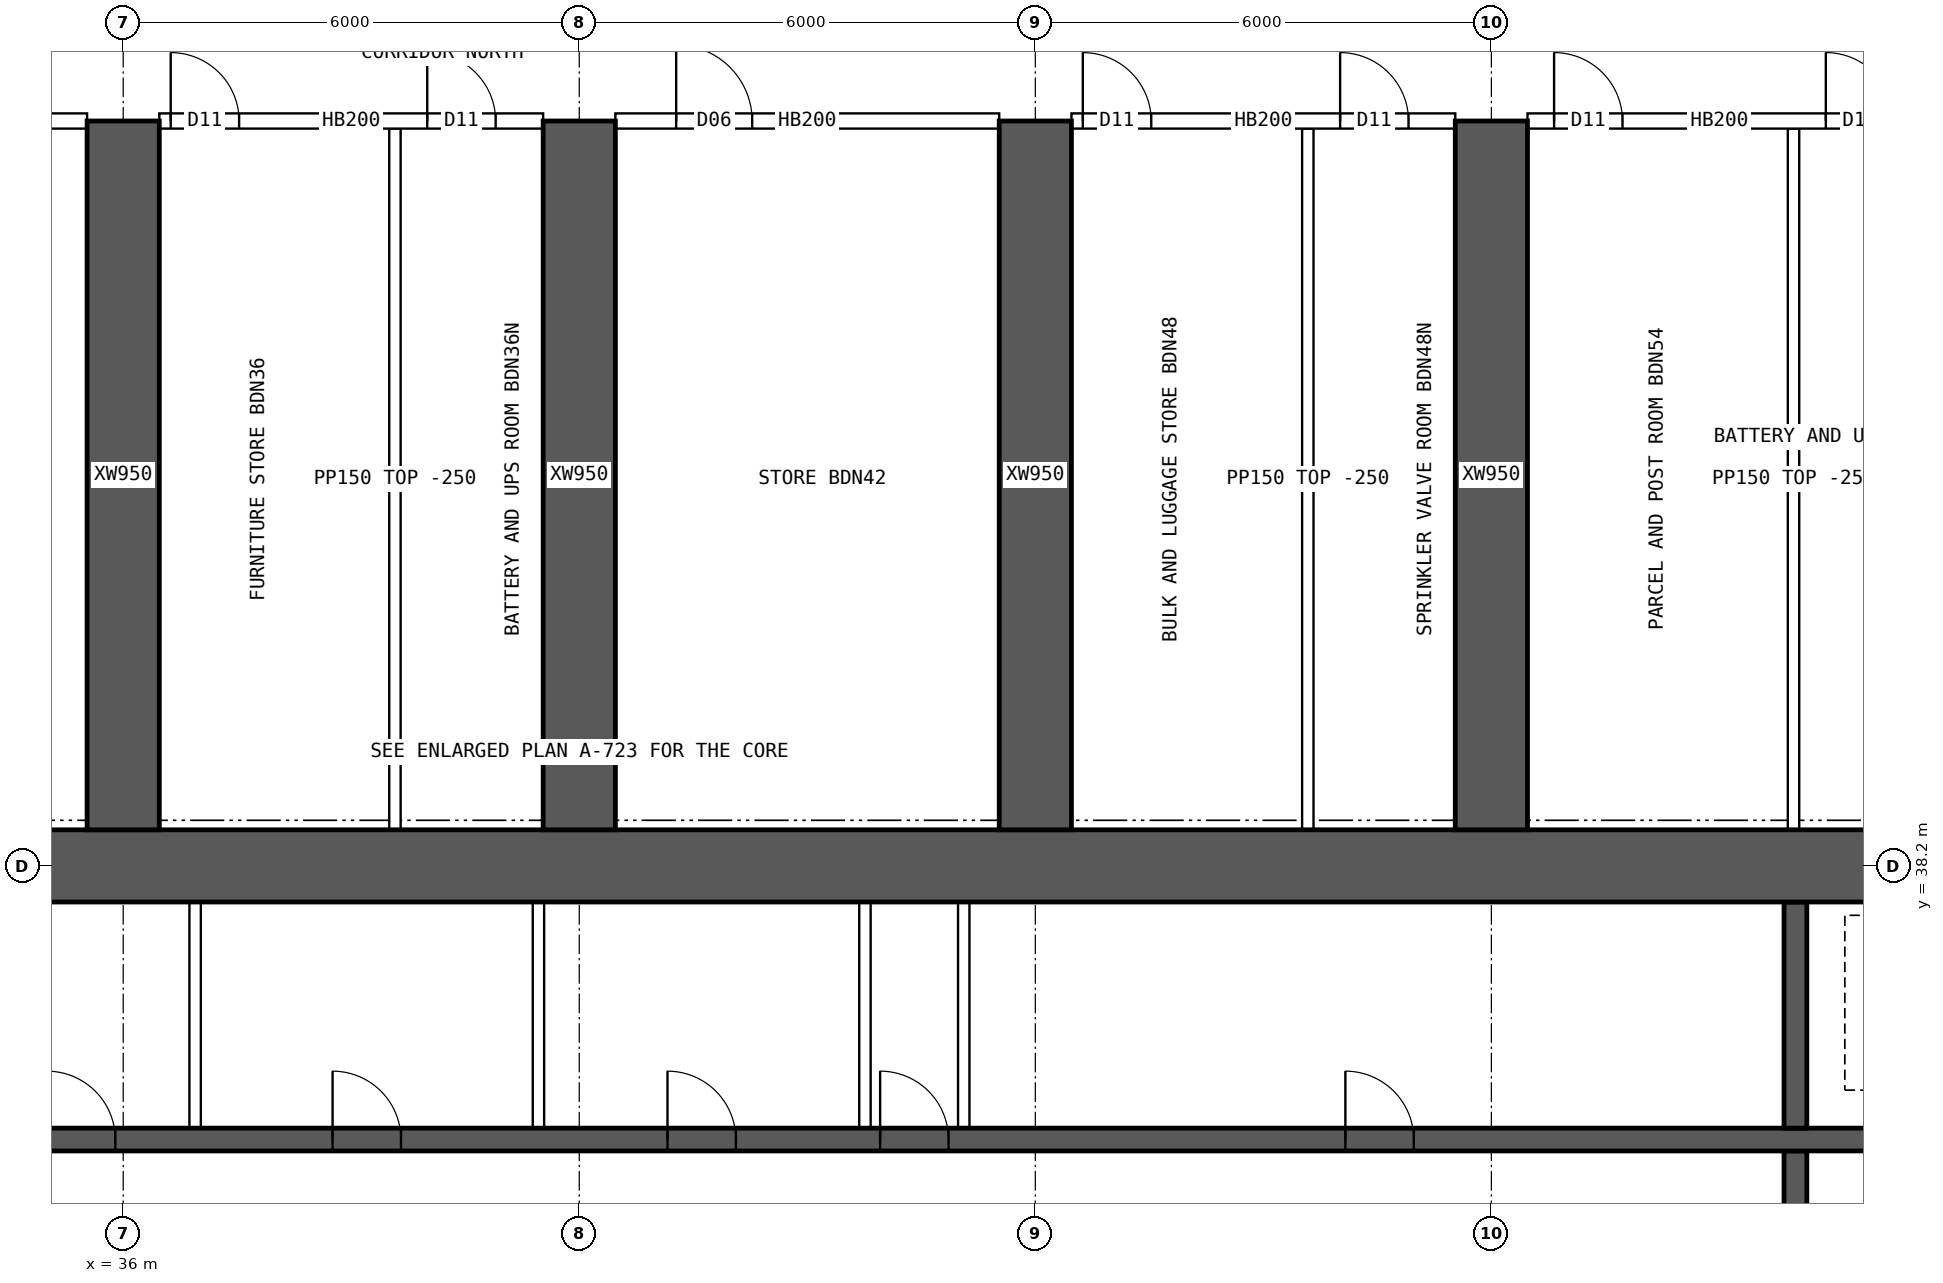
"""IFC4 building model, lengths in metres.
Left out: names, types, materials, properties, quantities, classifications, styles, units other than length and angle.
Written with IfcOpenShell. Run it as: python <this file> out.ifc"""

import sys

from ifc_helpers import new_model, si_unit, direction, frame, frame_2d, origin, place, context, subcontext, project, spatial, rectangle, extrude, element, fill, save


model = new_model("IFC4")
c1 = context("Model", 3, precision=1e-05, world=origin(), true_north=direction((0.0, 1.0)))
c2 = subcontext(c1, "Body", "Model", "MODEL_VIEW")
j1 = project(units=[si_unit("LENGTHUNIT", "METRE"), si_unit("PLANEANGLEUNIT", "RADIAN")], contexts=[c1])
p1 = place(None, origin())
s1 = spatial("IfcSite", under=j1, at=p1, CompositionType="ELEMENT")
p2 = place(p1, origin())
s2 = spatial("IfcBuilding", under=s1, at=p2, CompositionType="ELEMENT")
p3 = place(p2, frame((0.0, 0.0, 84.4)))
s3 = spatial("IfcBuildingStorey", under=s2, at=p3, CompositionType="ELEMENT", Elevation=84.4)
p4 = place(p3, frame((18.0, 38.2, 0.0), z_axis=(0.0, 0.0, 1.0), x_axis=(1.0, 0.0, 0.0)))
e1 = element("IfcWall", 1, at=p4, inside=s3, PredefinedType="SHEAR", context=c2, shape_type="SweptSolid", body=[
    extrude(rectangle(XDim=48.0, YDim=0.95, at=frame_2d((24.0, 0.0))), origin(), (0.0, 0.0, 1.0), 3.75),
])
p5 = place(p3, frame((18.475, 34.6, 0.0), z_axis=(0.0, 0.0, 1.0), x_axis=(1.0, 0.0, 0.0)))
e2 = element("IfcWall", 2, at=p5, inside=s3, PredefinedType="SHEAR", context=c2, shape_type="SweptSolid", body=[
    extrude(rectangle(XDim=47.05, YDim=0.3, at=frame_2d((23.525, 0.0))), origin(), (0.0, 0.0, 1.0), 3.75),
])
p6 = place(p5, frame((0.9, 0.0, 0.0)))
e3 = element("IfcOpeningElement", 3, at=p6, cuts=e2, PredefinedType="OPENING", context=c2, shape_type="SweptSolid", body=[
    extrude(rectangle(XDim=1.1, YDim=2.1, at=frame_2d((0.55, 1.05))), frame((0.0, 0.16, 0.0), z_axis=(0.0, -1.0, 0.0), x_axis=(1.0, 0.0, 0.0)), (0.0, 0.0, 1.0), 0.32),
])
p7 = place(p5, frame((45.05, 0.0, 0.0)))
e4 = element("IfcOpeningElement", 4, at=p7, cuts=e2, PredefinedType="OPENING", context=c2, shape_type="SweptSolid", body=[
    extrude(rectangle(XDim=1.1, YDim=2.1, at=frame_2d((0.55, 1.05))), frame((0.0, 0.16, 0.0), z_axis=(0.0, -1.0, 0.0), x_axis=(1.0, 0.0, 0.0)), (0.0, 0.0, 1.0), 0.32),
])
p8 = place(p5, frame((4.125, 0.0, 0.0)))
e5 = element("IfcOpeningElement", 5, at=p8, cuts=e2, PredefinedType="OPENING", context=c2, shape_type="SweptSolid", body=[
    extrude(rectangle(XDim=0.9, YDim=2.1, at=frame_2d((0.45, 1.05))), frame((0.0, 0.16, 0.0), z_axis=(0.0, -1.0, 0.0), x_axis=(1.0, 0.0, 0.0)), (0.0, 0.0, 1.0), 0.32),
])
p9 = place(p5, frame((42.025, 0.0, 0.0)))
e6 = element("IfcOpeningElement", 6, at=p9, cuts=e2, PredefinedType="OPENING", context=c2, shape_type="SweptSolid", body=[
    extrude(rectangle(XDim=0.9, YDim=2.1, at=frame_2d((0.45, 1.05))), frame((0.0, 0.16, 0.0), z_axis=(0.0, -1.0, 0.0), x_axis=(1.0, 0.0, 0.0)), (0.0, 0.0, 1.0), 0.32),
])
p10 = place(p5, frame((8.9, 0.0, 0.0)))
e7 = element("IfcOpeningElement", 7, at=p10, cuts=e2, PredefinedType="OPENING", context=c2, shape_type="SweptSolid", body=[
    extrude(rectangle(XDim=0.9, YDim=2.1, at=frame_2d((0.45, 1.05))), frame((0.0, 0.16, 0.0), z_axis=(0.0, -1.0, 0.0), x_axis=(1.0, 0.0, 0.0)), (0.0, 0.0, 1.0), 0.32),
])
p11 = place(p5, frame((12.874, 0.0, 0.0)))
e8 = element("IfcOpeningElement", 8, at=p11, cuts=e2, PredefinedType="OPENING", context=c2, shape_type="SweptSolid", body=[
    extrude(rectangle(XDim=0.9, YDim=2.1, at=frame_2d((0.45, 1.05))), frame((0.0, 0.16, 0.0), z_axis=(0.0, -1.0, 0.0), x_axis=(1.0, 0.0, 0.0)), (0.0, 0.0, 1.0), 0.32),
])
p12 = place(p5, frame((16.521, 0.0, 0.0)))
e9 = element("IfcOpeningElement", 9, at=p12, cuts=e2, PredefinedType="OPENING", context=c2, shape_type="SweptSolid", body=[
    extrude(rectangle(XDim=0.9, YDim=2.1, at=frame_2d((0.45, 1.05))), frame((0.0, 0.16, 0.0), z_axis=(0.0, -1.0, 0.0), x_axis=(1.0, 0.0, 0.0)), (0.0, 0.0, 1.0), 0.32),
])
p13 = place(p5, frame((20.28, 0.0, 0.0)))
e10 = element("IfcOpeningElement", 10, at=p13, cuts=e2, PredefinedType="OPENING", context=c2, shape_type="SweptSolid", body=[
    extrude(rectangle(XDim=0.9, YDim=2.1, at=frame_2d((0.45, 1.05))), frame((0.0, 0.16, 0.0), z_axis=(0.0, -1.0, 0.0), x_axis=(1.0, 0.0, 0.0)), (0.0, 0.0, 1.0), 0.32),
])
p14 = place(p5, frame((24.686, 0.0, 0.0)))
e11 = element("IfcOpeningElement", 11, at=p14, cuts=e2, PredefinedType="OPENING", context=c2, shape_type="SweptSolid", body=[
    extrude(rectangle(XDim=0.9, YDim=2.1, at=frame_2d((0.45, 1.05))), frame((0.0, 0.16, 0.0), z_axis=(0.0, -1.0, 0.0), x_axis=(1.0, 0.0, 0.0)), (0.0, 0.0, 1.0), 0.32),
])
p15 = place(p5, frame((27.483, 0.0, 0.0)))
e12 = element("IfcOpeningElement", 12, at=p15, cuts=e2, PredefinedType="OPENING", context=c2, shape_type="SweptSolid", body=[
    extrude(rectangle(XDim=0.9, YDim=2.1, at=frame_2d((0.45, 1.05))), frame((0.0, 0.16, 0.0), z_axis=(0.0, -1.0, 0.0), x_axis=(1.0, 0.0, 0.0)), (0.0, 0.0, 1.0), 0.32),
])
p16 = place(p5, frame((33.604, 0.0, 0.0)))
e13 = element("IfcOpeningElement", 13, at=p16, cuts=e2, PredefinedType="OPENING", context=c2, shape_type="SweptSolid", body=[
    extrude(rectangle(XDim=0.9, YDim=2.1, at=frame_2d((0.45, 1.05))), frame((0.0, 0.16, 0.0), z_axis=(0.0, -1.0, 0.0), x_axis=(1.0, 0.0, 0.0)), (0.0, 0.0, 1.0), 0.32),
])
p17 = place(p3, frame((58.0, 30.55, 0.0), z_axis=(0.0, 0.0, 1.0), x_axis=(0.0, 1.0, 0.0)))
e14 = element("IfcWall", 14, at=p17, inside=s3, PredefinedType="SHEAR", context=c2, shape_type="SweptSolid", body=[
    extrude(rectangle(XDim=3.9, YDim=0.3, at=frame_2d((1.95, 0.0))), origin(), (0.0, 0.0, 1.0), 3.75),
])
p18 = place(p17, frame((1.4, 0.0, 0.0)))
e15 = element("IfcOpeningElement", 15, at=p18, cuts=e14, PredefinedType="OPENING", context=c2, shape_type="SweptSolid", body=[
    extrude(rectangle(XDim=1.2, YDim=2.1, at=frame_2d((0.6, 1.05))), frame((0.0, 0.16, 0.0), z_axis=(0.0, -1.0, 0.0), x_axis=(1.0, 0.0, 0.0)), (0.0, 0.0, 1.0), 0.32),
])
p19 = place(p3, frame((58.0, 34.75, 0.0), z_axis=(0.0, 0.0, 1.0), x_axis=(0.0, 1.0, 0.0)))
e16 = element("IfcWall", 16, at=p19, inside=s3, PredefinedType="SHEAR", context=c2, shape_type="SweptSolid", body=[
    extrude(rectangle(XDim=2.975, YDim=0.3, at=frame_2d((1.488, 0.0))), origin(), (0.0, 0.0, 1.0), 3.75),
])
for number, where, z_axis, x_axis in (
    (17, (36.0, 38.675, 0.0), (0.0, 0.0, 1.0), (0.0, 1.0, 0.0)),
    (18, (42.0, 38.675, 0.0), (0.0, 0.0, 1.0), (0.0, 1.0, 0.0)),
    (19, (48.0, 38.675, 0.0), (0.0, 0.0, 1.0), (0.0, 1.0, 0.0)),
    (20, (54.0, 38.675, 0.0), (0.0, 0.0, 1.0), (0.0, 1.0, 0.0)),
):
    element("IfcWall", number, at=place(p3, frame(where, z_axis=z_axis, x_axis=x_axis)), inside=s3, PredefinedType="SHEAR", context=c2, shape_type="SweptSolid", body=[
        extrude(rectangle(XDim=9.325, YDim=0.95, at=frame_2d((4.663, 0.0))), origin(), (0.0, 0.0, 1.0), 3.75),
    ])
for number, where, z_axis, x_axis in (
    (21, (36.946, 34.75, 0.0), (0.0, 0.0, 1.0), (0.0, 1.0, 0.0)),
    (22, (41.463, 34.75, 0.0), (0.0, 0.0, 1.0), (0.0, 1.0, 0.0)),
    (23, (45.758, 34.75, 0.0), (0.0, 0.0, 1.0), (0.0, 1.0, 0.0)),
    (24, (47.058, 34.75, 0.0), (0.0, 0.0, 1.0), (0.0, 1.0, 0.0)),
):
    element("IfcWall", number, at=place(p3, frame(where, z_axis=z_axis, x_axis=x_axis)), inside=s3, PredefinedType="SOLIDWALL", context=c2, shape_type="SweptSolid", body=[
        extrude(rectangle(XDim=2.975, YDim=0.15, at=frame_2d((1.488, 0.0))), origin(), (0.0, 0.0, 1.0), 3.5),
    ])
p20 = place(p3, frame((30.475, 48.0, 0.0), z_axis=(0.0, 0.0, 1.0), x_axis=(1.0, 0.0, 0.0)))
e25 = element("IfcWall", 25, at=p20, inside=s3, PredefinedType="SOLIDWALL", context=c2, shape_type="SweptSolid", body=[
    extrude(rectangle(XDim=5.05, YDim=0.2, at=frame_2d((2.525, 0.0))), origin(), (0.0, 0.0, 1.0), 3.5),
])
p21 = place(p20, frame((0.8, 0.0, 0.0)))
e26 = element("IfcOpeningElement", 26, at=p21, cuts=e25, PredefinedType="OPENING", context=c2, shape_type="SweptSolid", body=[
    extrude(rectangle(XDim=1.0, YDim=2.1, at=frame_2d((0.5, 1.05))), frame((0.0, 0.11, 0.0), z_axis=(0.0, -1.0, 0.0), x_axis=(1.0, 0.0, 0.0)), (0.0, 0.0, 1.0), 0.22),
])
p22 = place(p3, frame((36.475, 48.0, 0.0), z_axis=(0.0, 0.0, 1.0), x_axis=(1.0, 0.0, 0.0)))
e27 = element("IfcWall", 27, at=p22, inside=s3, PredefinedType="SOLIDWALL", context=c2, shape_type="SweptSolid", body=[
    extrude(rectangle(XDim=5.05, YDim=0.2, at=frame_2d((2.525, 0.0))), origin(), (0.0, 0.0, 1.0), 3.5),
])
p23 = place(p22, frame((0.15, 0.0, 0.0)))
e28 = element("IfcOpeningElement", 28, at=p23, cuts=e27, PredefinedType="OPENING", context=c2, shape_type="SweptSolid", body=[
    extrude(rectangle(XDim=0.9, YDim=2.1, at=frame_2d((0.45, 1.05))), frame((0.0, 0.11, 0.0), z_axis=(0.0, -1.0, 0.0), x_axis=(1.0, 0.0, 0.0)), (0.0, 0.0, 1.0), 0.22),
])
p24 = place(p22, frame((3.525, 0.0, 0.0)))
e29 = element("IfcOpeningElement", 29, at=p24, cuts=e27, PredefinedType="OPENING", context=c2, shape_type="SweptSolid", body=[
    extrude(rectangle(XDim=0.9, YDim=2.1, at=frame_2d((0.45, 1.05))), frame((0.0, 0.11, 0.0), z_axis=(0.0, -1.0, 0.0), x_axis=(1.0, 0.0, 0.0)), (0.0, 0.0, 1.0), 0.22),
])
p25 = place(p3, frame((42.475, 48.0, 0.0), z_axis=(0.0, 0.0, 1.0), x_axis=(1.0, 0.0, 0.0)))
e30 = element("IfcWall", 30, at=p25, inside=s3, PredefinedType="SOLIDWALL", context=c2, shape_type="SweptSolid", body=[
    extrude(rectangle(XDim=5.05, YDim=0.2, at=frame_2d((2.525, 0.0))), origin(), (0.0, 0.0, 1.0), 3.5),
])
p26 = place(p25, frame((0.8, 0.0, 0.0)))
e31 = element("IfcOpeningElement", 31, at=p26, cuts=e30, PredefinedType="OPENING", context=c2, shape_type="SweptSolid", body=[
    extrude(rectangle(XDim=1.0, YDim=2.1, at=frame_2d((0.5, 1.05))), frame((0.0, 0.11, 0.0), z_axis=(0.0, -1.0, 0.0), x_axis=(1.0, 0.0, 0.0)), (0.0, 0.0, 1.0), 0.22),
])
p27 = place(p3, frame((48.475, 48.0, 0.0), z_axis=(0.0, 0.0, 1.0), x_axis=(1.0, 0.0, 0.0)))
e32 = element("IfcWall", 32, at=p27, inside=s3, PredefinedType="SOLIDWALL", context=c2, shape_type="SweptSolid", body=[
    extrude(rectangle(XDim=5.05, YDim=0.2, at=frame_2d((2.525, 0.0))), origin(), (0.0, 0.0, 1.0), 3.5),
])
p28 = place(p27, frame((0.15, 0.0, 0.0)))
e33 = element("IfcOpeningElement", 33, at=p28, cuts=e32, PredefinedType="OPENING", context=c2, shape_type="SweptSolid", body=[
    extrude(rectangle(XDim=0.9, YDim=2.1, at=frame_2d((0.45, 1.05))), frame((0.0, 0.11, 0.0), z_axis=(0.0, -1.0, 0.0), x_axis=(1.0, 0.0, 0.0)), (0.0, 0.0, 1.0), 0.22),
])
p29 = place(p27, frame((3.535, 0.0, 0.0)))
e34 = element("IfcOpeningElement", 34, at=p29, cuts=e32, PredefinedType="OPENING", context=c2, shape_type="SweptSolid", body=[
    extrude(rectangle(XDim=0.9, YDim=2.1, at=frame_2d((0.45, 1.05))), frame((0.0, 0.11, 0.0), z_axis=(0.0, -1.0, 0.0), x_axis=(1.0, 0.0, 0.0)), (0.0, 0.0, 1.0), 0.22),
])
p30 = place(p3, frame((54.475, 48.0, 0.0), z_axis=(0.0, 0.0, 1.0), x_axis=(1.0, 0.0, 0.0)))
e35 = element("IfcWall", 35, at=p30, inside=s3, PredefinedType="SOLIDWALL", context=c2, shape_type="SweptSolid", body=[
    extrude(rectangle(XDim=5.05, YDim=0.2, at=frame_2d((2.525, 0.0))), origin(), (0.0, 0.0, 1.0), 3.5),
])
p31 = place(p30, frame((0.35, 0.0, 0.0)))
e36 = element("IfcOpeningElement", 36, at=p31, cuts=e35, PredefinedType="OPENING", context=c2, shape_type="SweptSolid", body=[
    extrude(rectangle(XDim=0.9, YDim=2.1, at=frame_2d((0.45, 1.05))), frame((0.0, 0.11, 0.0), z_axis=(0.0, -1.0, 0.0), x_axis=(1.0, 0.0, 0.0)), (0.0, 0.0, 1.0), 0.22),
])
p32 = place(p30, frame((3.925, 0.0, 0.0)))
e37 = element("IfcOpeningElement", 37, at=p32, cuts=e35, PredefinedType="OPENING", context=c2, shape_type="SweptSolid", body=[
    extrude(rectangle(XDim=0.9, YDim=2.1, at=frame_2d((0.45, 1.05))), frame((0.0, 0.11, 0.0), z_axis=(0.0, -1.0, 0.0), x_axis=(1.0, 0.0, 0.0)), (0.0, 0.0, 1.0), 0.22),
])
for number, where, z_axis, x_axis in (
    (38, (39.575, 38.675, 0.0), (0.0, 0.0, 1.0), (0.0, 1.0, 0.0)),
    (39, (51.585, 38.675, 0.0), (0.0, 0.0, 1.0), (0.0, 1.0, 0.0)),
    (40, (57.975, 38.675, 0.0), (0.0, 0.0, 1.0), (0.0, 1.0, 0.0)),
):
    element("IfcWall", number, at=place(p3, frame(where, z_axis=z_axis, x_axis=x_axis)), inside=s3, PredefinedType="PARTITIONING", context=c2, shape_type="SweptSolid", body=[
        extrude(rectangle(XDim=9.225, YDim=0.15, at=frame_2d((4.612, 0.0))), origin(), (0.0, 0.0, 1.0), 3.5),
    ])
p33 = place(p12, origin())
e41 = element("IfcDoor", 41, at=p33, inside=s3, OperationType="SINGLE_SWING_LEFT", PredefinedType="DOOR", context=c2, shape_type="SweptSolid", body=[
    extrude(rectangle(XDim=0.9, YDim=2.1, at=frame_2d((0.45, 1.05))), frame((0.0, 0.025, 0.0), z_axis=(0.0, -1.0, 0.0), x_axis=(1.0, 0.0, 0.0)), (0.0, 0.0, 1.0), 0.05),
])
fill(e9, e41)
p34 = place(p13, origin())
e42 = element("IfcDoor", 42, at=p34, inside=s3, OperationType="SINGLE_SWING_LEFT", PredefinedType="DOOR", context=c2, shape_type="SweptSolid", body=[
    extrude(rectangle(XDim=0.9, YDim=2.1, at=frame_2d((0.45, 1.05))), frame((0.0, 0.025, 0.0), z_axis=(0.0, -1.0, 0.0), x_axis=(1.0, 0.0, 0.0)), (0.0, 0.0, 1.0), 0.05),
])
fill(e10, e42)
p35 = place(p14, origin())
e43 = element("IfcDoor", 43, at=p35, inside=s3, OperationType="SINGLE_SWING_LEFT", PredefinedType="DOOR", context=c2, shape_type="SweptSolid", body=[
    extrude(rectangle(XDim=0.9, YDim=2.1, at=frame_2d((0.45, 1.05))), frame((0.0, 0.025, 0.0), z_axis=(0.0, -1.0, 0.0), x_axis=(1.0, 0.0, 0.0)), (0.0, 0.0, 1.0), 0.05),
])
fill(e11, e43)
p36 = place(p15, origin())
e44 = element("IfcDoor", 44, at=p36, inside=s3, OperationType="SINGLE_SWING_LEFT", PredefinedType="DOOR", context=c2, shape_type="SweptSolid", body=[
    extrude(rectangle(XDim=0.9, YDim=2.1, at=frame_2d((0.45, 1.05))), frame((0.0, 0.025, 0.0), z_axis=(0.0, -1.0, 0.0), x_axis=(1.0, 0.0, 0.0)), (0.0, 0.0, 1.0), 0.05),
])
fill(e12, e44)
p37 = place(p16, origin())
e45 = element("IfcDoor", 45, at=p37, inside=s3, OperationType="SINGLE_SWING_LEFT", PredefinedType="DOOR", context=c2, shape_type="SweptSolid", body=[
    extrude(rectangle(XDim=0.9, YDim=2.1, at=frame_2d((0.45, 1.05))), frame((0.0, 0.025, 0.0), z_axis=(0.0, -1.0, 0.0), x_axis=(1.0, 0.0, 0.0)), (0.0, 0.0, 1.0), 0.05),
])
fill(e13, e45)
p38 = place(p23, origin())
e46 = element("IfcDoor", 46, at=p38, inside=s3, OperationType="SINGLE_SWING_LEFT", PredefinedType="DOOR", context=c2, shape_type="SweptSolid", body=[
    extrude(rectangle(XDim=0.9, YDim=2.1, at=frame_2d((0.45, 1.05))), frame((0.0, 0.025, 0.0), z_axis=(0.0, -1.0, 0.0), x_axis=(1.0, 0.0, 0.0)), (0.0, 0.0, 1.0), 0.05),
])
fill(e28, e46)
p39 = place(p24, origin())
e47 = element("IfcDoor", 47, at=p39, inside=s3, OperationType="SINGLE_SWING_LEFT", PredefinedType="DOOR", context=c2, shape_type="SweptSolid", body=[
    extrude(rectangle(XDim=0.9, YDim=2.1, at=frame_2d((0.45, 1.05))), frame((0.0, 0.025, 0.0), z_axis=(0.0, -1.0, 0.0), x_axis=(1.0, 0.0, 0.0)), (0.0, 0.0, 1.0), 0.05),
])
fill(e29, e47)
p40 = place(p26, origin())
e48 = element("IfcDoor", 48, at=p40, inside=s3, OperationType="SINGLE_SWING_LEFT", PredefinedType="DOOR", context=c2, shape_type="SweptSolid", body=[
    extrude(rectangle(XDim=1.0, YDim=2.1, at=frame_2d((0.5, 1.05))), frame((0.0, 0.025, 0.0), z_axis=(0.0, -1.0, 0.0), x_axis=(1.0, 0.0, 0.0)), (0.0, 0.0, 1.0), 0.05),
])
fill(e31, e48)
p41 = place(p28, origin())
e49 = element("IfcDoor", 49, at=p41, inside=s3, OperationType="SINGLE_SWING_LEFT", PredefinedType="DOOR", context=c2, shape_type="SweptSolid", body=[
    extrude(rectangle(XDim=0.9, YDim=2.1, at=frame_2d((0.45, 1.05))), frame((0.0, 0.025, 0.0), z_axis=(0.0, -1.0, 0.0), x_axis=(1.0, 0.0, 0.0)), (0.0, 0.0, 1.0), 0.05),
])
fill(e33, e49)
p42 = place(p29, origin())
e50 = element("IfcDoor", 50, at=p42, inside=s3, OperationType="SINGLE_SWING_LEFT", PredefinedType="DOOR", context=c2, shape_type="SweptSolid", body=[
    extrude(rectangle(XDim=0.9, YDim=2.1, at=frame_2d((0.45, 1.05))), frame((0.0, 0.025, 0.0), z_axis=(0.0, -1.0, 0.0), x_axis=(1.0, 0.0, 0.0)), (0.0, 0.0, 1.0), 0.05),
])
fill(e34, e50)
p43 = place(p31, origin())
e51 = element("IfcDoor", 51, at=p43, inside=s3, OperationType="SINGLE_SWING_LEFT", PredefinedType="DOOR", context=c2, shape_type="SweptSolid", body=[
    extrude(rectangle(XDim=0.9, YDim=2.1, at=frame_2d((0.45, 1.05))), frame((0.0, 0.025, 0.0), z_axis=(0.0, -1.0, 0.0), x_axis=(1.0, 0.0, 0.0)), (0.0, 0.0, 1.0), 0.05),
])
fill(e36, e51)
p44 = place(p32, origin())
e52 = element("IfcDoor", 52, at=p44, inside=s3, OperationType="SINGLE_SWING_LEFT", PredefinedType="DOOR", context=c2, shape_type="SweptSolid", body=[
    extrude(rectangle(XDim=0.9, YDim=2.1, at=frame_2d((0.45, 1.05))), frame((0.0, 0.025, 0.0), z_axis=(0.0, -1.0, 0.0), x_axis=(1.0, 0.0, 0.0)), (0.0, 0.0, 1.0), 0.05),
])
fill(e37, e52)
save(model, sys.argv[1])
